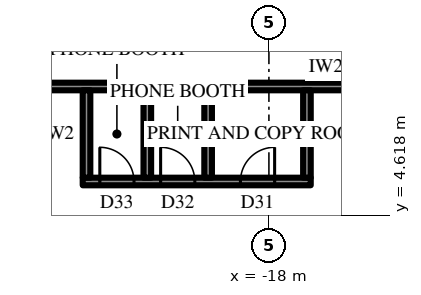
"""IFC4 building model, lengths in metres.
Left out: names, types, materials, properties, quantities, classifications, styles, units other than length and angle.
Written with IfcOpenShell. Run it as: python <this file> out.ifc"""

import sys

from ifc_helpers import new_model, si_unit, direction, frame, frame_2d, origin, place, context, subcontext, project, spatial, rectangle, extrude, element, fill, save


model = new_model("IFC4")
c1 = context("Model", 3, precision=1e-05, world=origin(), true_north=direction((0.0, 1.0)))
c2 = subcontext(c1, "Body", "Model", "MODEL_VIEW")
j1 = project(units=[si_unit("LENGTHUNIT", "METRE"), si_unit("PLANEANGLEUNIT", "RADIAN")], contexts=[c1])
p1 = place(None, origin())
s1 = spatial("IfcSite", under=j1, at=p1, CompositionType="ELEMENT")
p2 = place(p1, origin())
s2 = spatial("IfcBuilding", under=s1, at=p2, CompositionType="ELEMENT")
p3 = place(p2, frame((0.0, 0.0, 382.9)))
s3 = spatial("IfcBuildingStorey", under=s2, at=p3, CompositionType="ELEMENT", Elevation=382.9)
p4 = place(p3, frame((-12.425, 8.0, 0.0), z_axis=(0.0, 0.0, 1.0), x_axis=(-1.0, 0.0, 0.0)))
e1 = element("IfcWall", 1, at=p4, inside=s3, PredefinedType="PARTITIONING", context=c2, shape_type="SweptSolid", body=[
    extrude(rectangle(XDim=13.59, YDim=0.2, at=frame_2d((6.795, 0.0))), origin(), (0.0, 0.0, 1.0), 4.0),
])
p5 = place(p4, frame((0.859, 0.0, 0.0)))
e2 = element("IfcOpeningElement", 2, at=p5, cuts=e1, PredefinedType="OPENING", context=c2, shape_type="SweptSolid", body=[
    extrude(rectangle(XDim=1.0, YDim=2.2, at=frame_2d((0.5, 1.1))), frame((0.0, 0.11, 0.0), z_axis=(0.0, -1.0, 0.0), x_axis=(1.0, 0.0, 0.0)), (0.0, 0.0, 1.0), 0.22),
])
p6 = place(p3, frame((-16.9, 5.5, 0.0), z_axis=(0.0, 0.0, 1.0), x_axis=(-1.0, 0.0, 0.0)))
e3 = element("IfcWall", 3, at=p6, inside=s3, PredefinedType="PARTITIONING", context=c2, shape_type="SweptSolid", body=[
    extrude(rectangle(XDim=6.0, YDim=0.2, at=frame_2d((3.0, 0.0))), origin(), (0.0, 0.0, 1.0), 4.0),
])
p7 = place(p6, frame((0.95, 0.0, 0.0)))
e4 = element("IfcOpeningElement", 4, at=p7, cuts=e3, PredefinedType="OPENING", context=c2, shape_type="SweptSolid", body=[
    extrude(rectangle(XDim=0.9, YDim=2.2, at=frame_2d((0.45, 1.1))), frame((0.0, 0.11, 0.0), z_axis=(0.0, -1.0, 0.0), x_axis=(1.0, 0.0, 0.0)), (0.0, 0.0, 1.0), 0.22),
])
p8 = place(p6, frame((3.05, 0.0, 0.0)))
e5 = element("IfcOpeningElement", 5, at=p8, cuts=e3, PredefinedType="OPENING", context=c2, shape_type="SweptSolid", body=[
    extrude(rectangle(XDim=0.9, YDim=2.2, at=frame_2d((0.45, 1.1))), frame((0.0, 0.11, 0.0), z_axis=(0.0, -1.0, 0.0), x_axis=(1.0, 0.0, 0.0)), (0.0, 0.0, 1.0), 0.22),
])
p9 = place(p6, frame((4.65, 0.0, 0.0)))
e6 = element("IfcOpeningElement", 6, at=p9, cuts=e3, PredefinedType="OPENING", context=c2, shape_type="SweptSolid", body=[
    extrude(rectangle(XDim=0.9, YDim=2.2, at=frame_2d((0.45, 1.1))), frame((0.0, 0.11, 0.0), z_axis=(0.0, -1.0, 0.0), x_axis=(1.0, 0.0, 0.0)), (0.0, 0.0, 1.0), 0.22),
])
for number, where, z_axis, x_axis in (
    (7, (-17.0, 7.9, 0.0), (0.0, 0.0, 1.0), (0.0, -1.0, 0.0)),
    (8, (-19.6, 7.9, 0.0), (0.0, 0.0, 1.0), (0.0, -1.0, 0.0)),
    (9, (-21.2, 7.9, 0.0), (0.0, 0.0, 1.0), (0.0, -1.0, 0.0)),
    (10, (-22.8, 7.9, 0.0), (0.0, 0.0, 1.0), (0.0, -1.0, 0.0)),
):
    element("IfcWall", number, at=place(p3, frame(where, z_axis=z_axis, x_axis=x_axis)), inside=s3, PredefinedType="PARTITIONING", context=c2, shape_type="SweptSolid", body=[
        extrude(rectangle(XDim=2.3, YDim=0.2, at=frame_2d((1.15, 0.0))), origin(), (0.0, 0.0, 1.0), 4.0),
    ])
p10 = place(p7, frame((0.9, 0.0, 0.0), z_axis=(0.0, 0.0, 1.0), x_axis=(-1.0, 0.0, 0.0)))
e11 = element("IfcDoor", 11, at=p10, inside=s3, OperationType="SINGLE_SWING_LEFT", PredefinedType="DOOR", context=c2, shape_type="SweptSolid", body=[
    extrude(rectangle(XDim=0.9, YDim=2.2, at=frame_2d((0.45, 1.1))), frame((0.0, 0.025, 0.0), z_axis=(0.0, -1.0, 0.0), x_axis=(1.0, 0.0, 0.0)), (0.0, 0.0, 1.0), 0.05),
])
fill(e4, e11)
p11 = place(p8, frame((0.9, 0.0, 0.0), z_axis=(0.0, 0.0, 1.0), x_axis=(-1.0, 0.0, 0.0)))
e12 = element("IfcDoor", 12, at=p11, inside=s3, OperationType="SINGLE_SWING_RIGHT", PredefinedType="DOOR", context=c2, shape_type="SweptSolid", body=[
    extrude(rectangle(XDim=0.9, YDim=2.2, at=frame_2d((0.45, 1.1))), frame((0.0, 0.025, 0.0), z_axis=(0.0, -1.0, 0.0), x_axis=(1.0, 0.0, 0.0)), (0.0, 0.0, 1.0), 0.05),
])
fill(e5, e12)
p12 = place(p9, frame((0.9, 0.0, 0.0), z_axis=(0.0, 0.0, 1.0), x_axis=(-1.0, 0.0, 0.0)))
e13 = element("IfcDoor", 13, at=p12, inside=s3, OperationType="SINGLE_SWING_RIGHT", PredefinedType="DOOR", context=c2, shape_type="SweptSolid", body=[
    extrude(rectangle(XDim=0.9, YDim=2.2, at=frame_2d((0.45, 1.1))), frame((0.0, 0.025, 0.0), z_axis=(0.0, -1.0, 0.0), x_axis=(1.0, 0.0, 0.0)), (0.0, 0.0, 1.0), 0.05),
])
fill(e6, e13)
save(model, sys.argv[1])
